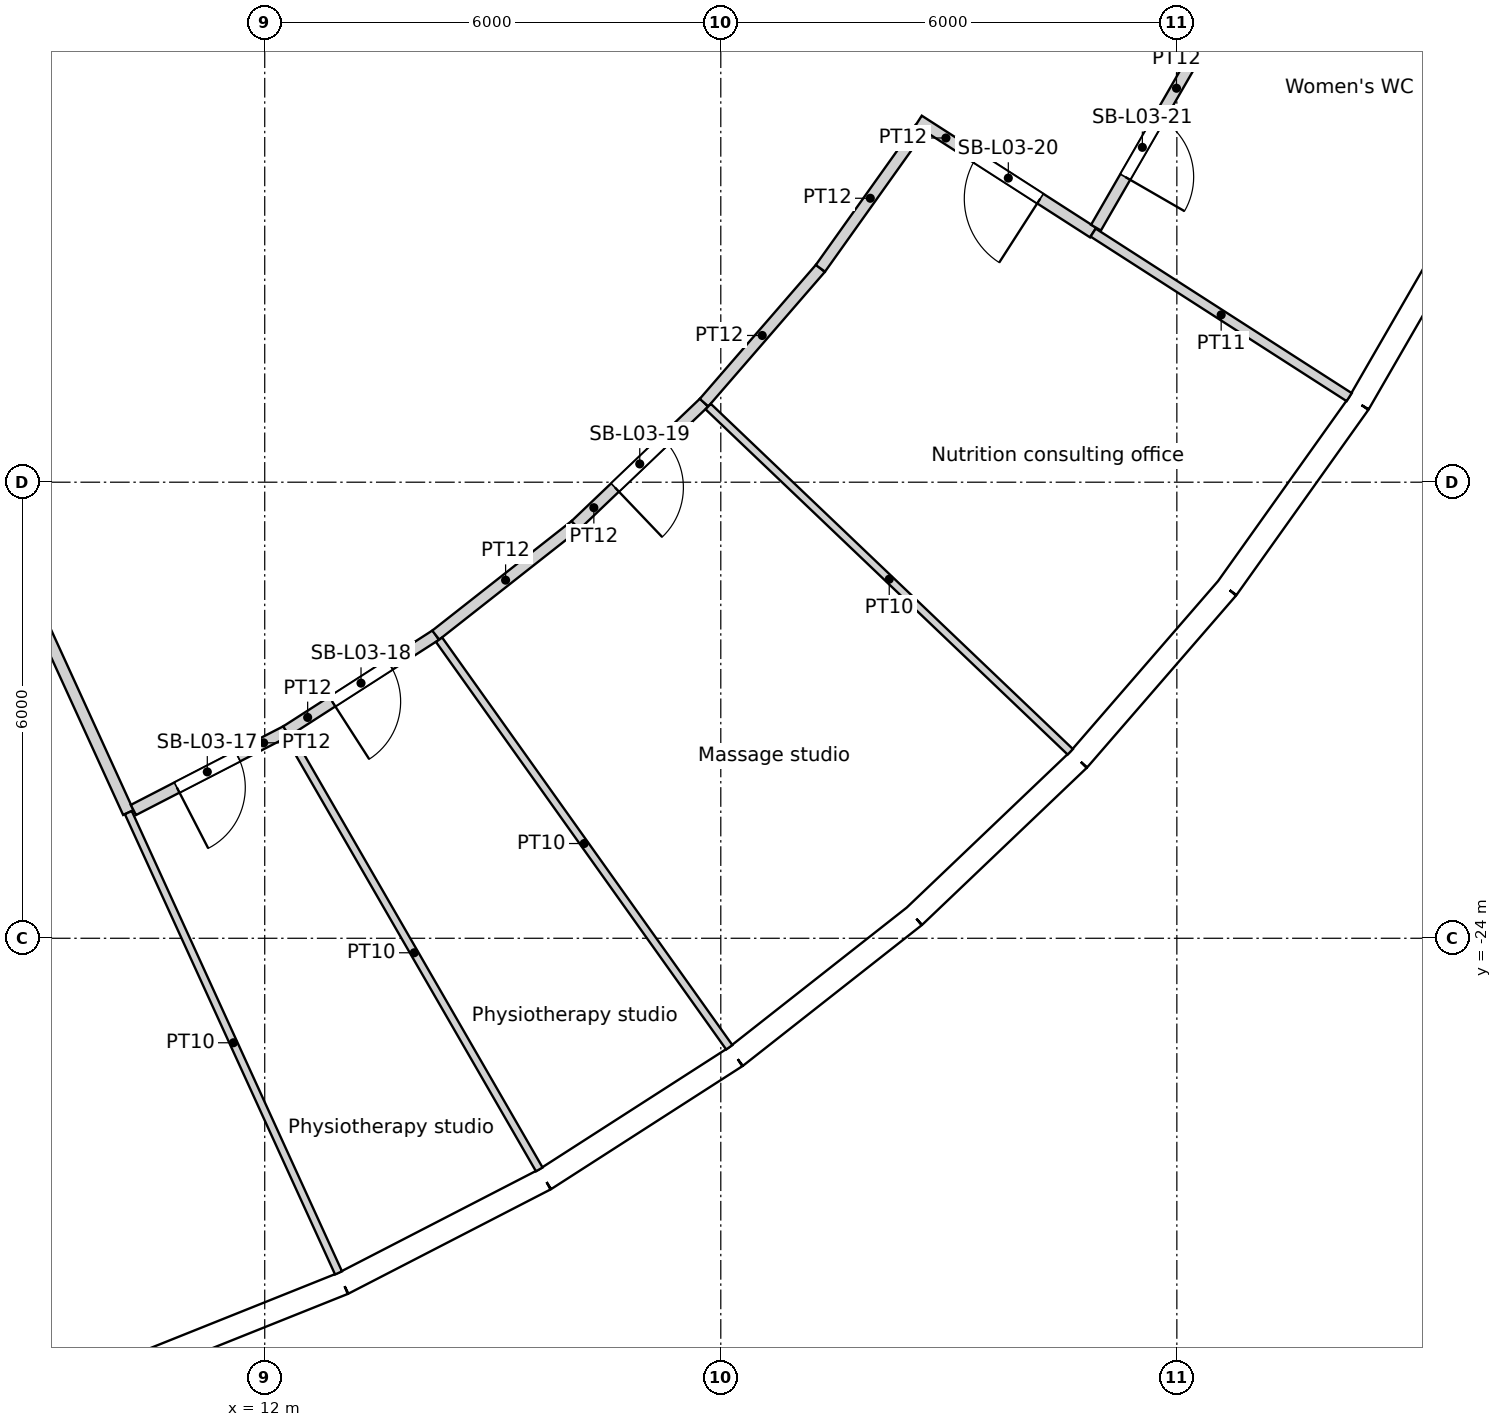
"""IFC4 building model, lengths in metres.
Left out: names, types, materials, properties, quantities, classifications, styles, units other than length and angle.
Written with IfcOpenShell. Run it as: python <this file> out.ifc"""

import sys

from ifc_helpers import new_model, si_unit, direction, frame, frame_2d, origin, origin_2d, place, context, subcontext, project, spatial, rectangle, circle, extrude, element, fill, save


model = new_model("IFC4")
c1 = context("Model", 3, precision=1e-05, world=origin(), true_north=direction((0.0, 1.0)))
c2 = subcontext(c1, "Body", "Model", "MODEL_VIEW")
j1 = project(units=[si_unit("LENGTHUNIT", "METRE"), si_unit("PLANEANGLEUNIT", "RADIAN")], contexts=[c1])
p1 = place(None, origin())
s1 = spatial("IfcSite", under=j1, at=p1, CompositionType="ELEMENT")
p2 = place(p1, origin())
s2 = spatial("IfcBuilding", under=s1, at=p2, CompositionType="ELEMENT")
p3 = place(p2, frame((0.0, 0.0, 18.6)))
s3 = spatial("IfcBuildingStorey", under=s2, at=p3, CompositionType="ELEMENT", Elevation=18.6)
for number, where, z_axis, x_axis in (
    (1, (12.576, -27.539, 0.0), (0.0, 0.0, 1.0), (1.0, 0.0, 0.0)),
    (2, (17.561, -24.661, 0.0), (0.0, 0.0, 1.0), (1.0, 0.0, 0.0)),
    (3, (21.911, -20.892, 0.0), (0.0, 0.0, 1.0), (1.0, 0.0, 0.0)),
    (4, (25.469, -16.368, 0.0), (0.0, 0.0, 1.0), (1.0, 0.0, 0.0)),
):
    element("IfcColumn", number, at=place(p3, frame(where, z_axis=z_axis, x_axis=x_axis)), inside=s3, PredefinedType="COLUMN", context=c2, shape_type="SweptSolid", body=[
        extrude(circle(Radius=0.7, at=origin_2d()), origin(), (0.0, 0.0, 1.0), 4.8),
    ])
for number, where, z_axis, x_axis in (
    (5, (9.723, -22.54, 0.0), (0.0, 0.0, 1.0), (1.0, 0.0, 0.0)),
    (6, (14.659, -19.69, 0.0), (0.0, 0.0, 1.0), (1.0, 0.0, 0.0)),
    (7, (18.805, -15.779, 0.0), (0.0, 0.0, 1.0), (1.0, 0.0, 0.0)),
):
    element("IfcColumn", number, at=place(p3, frame(where, z_axis=z_axis, x_axis=x_axis)), inside=s3, PredefinedType="COLUMN", context=c2, shape_type="SweptSolid", body=[
        extrude(circle(Radius=0.75, at=origin_2d()), origin(), (0.0, 0.0, 1.0), 4.8),
    ])
p4 = place(p3, frame((11.735, -14.716, 0.0), z_axis=(0.0, 0.0, 1.0), x_axis=(1.0, 0.0, 0.0)))
e8 = element("IfcColumn", 8, at=p4, inside=s3, PredefinedType="COLUMN", context=c2, shape_type="SweptSolid", body=[
    extrude(circle(Radius=0.8, at=origin_2d()), origin(), (0.0, 0.0, 1.0), 4.8),
])
p5 = place(p3, frame((10.261, -29.649, 0.0), z_axis=(0.0, 0.0, 1.0), x_axis=(0.928380795373, 0.371630325434, 0.0)))
e9 = element("IfcWall", 9, at=p5, inside=s3, PredefinedType="SOLIDWALL", context=c2, shape_type="SweptSolid", body=[
    extrude(rectangle(XDim=2.986, YDim=0.3, at=frame_2d((1.493, 0.0))), origin(), (0.0, 0.0, 1.0), 4.35),
])
p6 = place(p5, frame((1.493, 0.0, 2.0)))
e10 = element("IfcOpeningElement", 10, at=p6, cuts=e9, PredefinedType="OPENING", context=c2, shape_type="SweptSolid", body=[
    extrude(circle(Radius=1.2, at=origin_2d()), frame((0.0, 0.16, 0.0), z_axis=(0.0, -1.0, 0.0), x_axis=(1.0, 0.0, 0.0)), (0.0, 0.0, 1.0), 0.32),
])
p7 = place(p3, frame((13.033, -28.539, 0.0), z_axis=(0.0, 0.0, 1.0), x_axis=(0.888831268481, 0.458234630043, 0.0)))
e11 = element("IfcWall", 11, at=p7, inside=s3, PredefinedType="SOLIDWALL", context=c2, shape_type="SweptSolid", body=[
    extrude(rectangle(XDim=2.986, YDim=0.3, at=frame_2d((1.493, 0.0))), origin(), (0.0, 0.0, 1.0), 4.35),
])
p8 = place(p7, frame((1.493, 0.0, 2.0)))
e12 = element("IfcOpeningElement", 12, at=p8, cuts=e11, PredefinedType="OPENING", context=c2, shape_type="SweptSolid", body=[
    extrude(circle(Radius=1.2, at=origin_2d()), frame((0.0, 0.16, 0.0), z_axis=(0.0, -1.0, 0.0), x_axis=(1.0, 0.0, 0.0)), (0.0, 0.0, 1.0), 0.32),
])
p9 = place(p3, frame((15.687, -27.171, 0.0), z_axis=(0.0, 0.0, 1.0), x_axis=(0.841242231846, 0.540658401727, 0.0)))
e13 = element("IfcWall", 13, at=p9, inside=s3, PredefinedType="SOLIDWALL", context=c2, shape_type="SweptSolid", body=[
    extrude(rectangle(XDim=2.986, YDim=0.3, at=frame_2d((1.493, 0.0))), origin(), (0.0, 0.0, 1.0), 4.35),
])
p10 = place(p9, frame((1.493, 0.0, 2.0)))
e14 = element("IfcOpeningElement", 14, at=p10, cuts=e13, PredefinedType="OPENING", context=c2, shape_type="SweptSolid", body=[
    extrude(circle(Radius=1.2, at=origin_2d()), frame((0.0, 0.16, 0.0), z_axis=(0.0, -1.0, 0.0), x_axis=(1.0, 0.0, 0.0)), (0.0, 0.0, 1.0), 0.32),
])
p11 = place(p3, frame((18.199, -25.557, 0.0), z_axis=(0.0, 0.0, 1.0), x_axis=(0.786043032847, 0.618171780747, 0.0)))
e15 = element("IfcWall", 15, at=p11, inside=s3, PredefinedType="SOLIDWALL", context=c2, shape_type="SweptSolid", body=[
    extrude(rectangle(XDim=2.986, YDim=0.3, at=frame_2d((1.493, 0.0))), origin(), (0.0, 0.0, 1.0), 4.35),
])
p12 = place(p11, frame((1.493, 0.0, 2.0)))
e16 = element("IfcOpeningElement", 16, at=p12, cuts=e15, PredefinedType="OPENING", context=c2, shape_type="SweptSolid", body=[
    extrude(circle(Radius=1.2, at=origin_2d()), frame((0.0, 0.16, 0.0), z_axis=(0.0, -1.0, 0.0), x_axis=(1.0, 0.0, 0.0)), (0.0, 0.0, 1.0), 0.32),
])
p13 = place(p3, frame((20.546, -23.711, 0.0), z_axis=(0.0, 0.0, 1.0), x_axis=(0.723750841228, 0.690061388444, 0.0)))
e17 = element("IfcWall", 17, at=p13, inside=s3, PredefinedType="SOLIDWALL", context=c2, shape_type="SweptSolid", body=[
    extrude(rectangle(XDim=2.986, YDim=0.3, at=frame_2d((1.493, 0.0))), origin(), (0.0, 0.0, 1.0), 4.35),
])
p14 = place(p13, frame((1.493, 0.0, 2.0)))
e18 = element("IfcOpeningElement", 18, at=p14, cuts=e17, PredefinedType="OPENING", context=c2, shape_type="SweptSolid", body=[
    extrude(circle(Radius=1.2, at=origin_2d()), frame((0.0, 0.16, 0.0), z_axis=(0.0, -1.0, 0.0), x_axis=(1.0, 0.0, 0.0)), (0.0, 0.0, 1.0), 0.32),
])
p15 = place(p3, frame((22.707, -21.651, 0.0), z_axis=(0.0, 0.0, 1.0), x_axis=(0.654809121128, 0.755794294029, 0.0)))
e19 = element("IfcWall", 19, at=p15, inside=s3, PredefinedType="SOLIDWALL", context=c2, shape_type="SweptSolid", body=[
    extrude(rectangle(XDim=2.986, YDim=0.3, at=frame_2d((1.493, 0.0))), origin(), (0.0, 0.0, 1.0), 4.35),
])
p16 = place(p15, frame((1.493, 0.0, 2.0)))
e20 = element("IfcOpeningElement", 20, at=p16, cuts=e19, PredefinedType="OPENING", context=c2, shape_type="SweptSolid", body=[
    extrude(circle(Radius=1.2, at=origin_2d()), frame((0.0, 0.16, 0.0), z_axis=(0.0, -1.0, 0.0), x_axis=(1.0, 0.0, 0.0)), (0.0, 0.0, 1.0), 0.32),
])
p17 = place(p3, frame((24.662, -19.394, 0.0), z_axis=(0.0, 0.0, 1.0), x_axis=(0.580100533892, 0.814544885551, 0.0)))
e21 = element("IfcWall", 21, at=p17, inside=s3, PredefinedType="SOLIDWALL", context=c2, shape_type="SweptSolid", body=[
    extrude(rectangle(XDim=2.986, YDim=0.3, at=frame_2d((1.493, 0.0))), origin(), (0.0, 0.0, 1.0), 4.35),
])
p18 = place(p17, frame((1.493, 0.0, 2.0)))
e22 = element("IfcOpeningElement", 22, at=p18, cuts=e21, PredefinedType="OPENING", context=c2, shape_type="SweptSolid", body=[
    extrude(circle(Radius=1.2, at=origin_2d()), frame((0.0, 0.16, 0.0), z_axis=(0.0, -1.0, 0.0), x_axis=(1.0, 0.0, 0.0)), (0.0, 0.0, 1.0), 0.32),
])
p19 = place(p3, frame((26.394, -16.962, 0.0), z_axis=(0.0, 0.0, 1.0), x_axis=(0.500017373705, 0.866015372839, 0.0)))
e23 = element("IfcWall", 23, at=p19, inside=s3, PredefinedType="SOLIDWALL", context=c2, shape_type="SweptSolid", body=[
    extrude(rectangle(XDim=2.986, YDim=0.3, at=frame_2d((1.493, 0.0))), origin(), (0.0, 0.0, 1.0), 4.35),
])
p20 = place(p19, frame((1.493, 0.0, 2.0)))
e24 = element("IfcOpeningElement", 24, at=p20, cuts=e23, PredefinedType="OPENING", context=c2, shape_type="SweptSolid", body=[
    extrude(circle(Radius=1.2, at=origin_2d()), frame((0.0, 0.16, 0.0), z_axis=(0.0, -1.0, 0.0), x_axis=(1.0, 0.0, 0.0)), (0.0, 0.0, 1.0), 0.32),
])
p21 = place(p3, frame((10.205, -22.347, 0.0), z_axis=(0.0, 0.0, 1.0), x_axis=(-0.415410432201, 0.909634087322, 0.0)))
e25 = element("IfcWall", 25, at=p21, inside=s3, PredefinedType="PARTITIONING", context=c2, shape_type="SweptSolid", body=[
    extrude(rectangle(XDim=10.935, YDim=0.15, at=frame_2d((5.467, 0.0))), origin(), (0.0, 0.0, 1.0), 3.75),
])
p22 = place(p3, frame((12.283, -21.275, 0.0), z_axis=(0.0, 0.0, 1.0), x_axis=(-0.888834753306, -0.458227870514, 0.0)))
e26 = element("IfcWall", 26, at=p22, inside=s3, PredefinedType="PARTITIONING", context=c2, shape_type="SweptSolid", body=[
    extrude(rectangle(XDim=2.263, YDim=0.15, at=frame_2d((1.131, 0.0))), origin(), (0.0, 0.0, 1.0), 3.75),
])
p23 = place(p22, frame((0.719, 0.0, 0.0)))
e27 = element("IfcOpeningElement", 27, at=p23, cuts=e26, PredefinedType="OPENING", context=c2, shape_type="SweptSolid", body=[
    extrude(rectangle(XDim=0.9, YDim=2.1, at=frame_2d((0.45, 1.05))), frame((0.0, 0.075, 0.0), z_axis=(0.0, -1.0, 0.0), x_axis=(1.0, 0.0, 0.0)), (0.0, 0.0, 1.0), 0.15),
])
p24 = place(p3, frame((14.25, -20.011, 0.0), z_axis=(0.0, 0.0, 1.0), x_axis=(-0.841236155743, -0.540667855777, 0.0)))
e28 = element("IfcWall", 28, at=p24, inside=s3, PredefinedType="PARTITIONING", context=c2, shape_type="SweptSolid", body=[
    extrude(rectangle(XDim=2.338, YDim=0.15, at=frame_2d((1.169, 0.0))), origin(), (0.0, 0.0, 1.0), 3.75),
])
p25 = place(p24, frame((0.719, 0.0, 0.0)))
e29 = element("IfcOpeningElement", 29, at=p25, cuts=e28, PredefinedType="OPENING", context=c2, shape_type="SweptSolid", body=[
    extrude(rectangle(XDim=0.9, YDim=2.1, at=frame_2d((0.45, 1.05))), frame((0.0, 0.075, 0.0), z_axis=(0.0, -1.0, 0.0), x_axis=(1.0, 0.0, 0.0)), (0.0, 0.0, 1.0), 0.15),
])
p26 = place(p3, frame((12.971, -28.403, 0.0), z_axis=(0.0, 0.0, 1.0), x_axis=(-0.415413073128, 0.909632881263, 0.0)))
e30 = element("IfcWall", 30, at=p26, inside=s3, PredefinedType="PARTITIONING", context=c2, shape_type="SweptSolid", body=[
    extrude(rectangle(XDim=6.657, YDim=0.1, at=frame_2d((3.329, 0.0))), origin(), (0.0, 0.0, 1.0), 3.75),
])
p27 = place(p3, frame((14.25, -20.011, 0.0), z_axis=(0.0, 0.0, 1.0), x_axis=(0.786108126536, 0.618089001191, 0.0)))
e31 = element("IfcWall", 31, at=p27, inside=s3, PredefinedType="PARTITIONING", context=c2, shape_type="SweptSolid", body=[
    extrude(rectangle(XDim=2.338, YDim=0.15, at=frame_2d((1.169, 0.0))), origin(), (0.0, 0.0, 1.0), 3.75),
])
p28 = place(p3, frame((15.612, -27.041, 0.0), z_axis=(0.0, 0.0, 1.0), x_axis=(-0.499996417602, 0.866027472073, 0.0)))
e32 = element("IfcWall", 32, at=p28, inside=s3, PredefinedType="PARTITIONING", context=c2, shape_type="SweptSolid", body=[
    extrude(rectangle(XDim=6.583, YDim=0.1, at=frame_2d((3.291, 0.0))), origin(), (0.0, 0.0, 1.0), 3.75),
])
p29 = place(p3, frame((17.78, -16.953, 0.0), z_axis=(0.0, 0.0, 1.0), x_axis=(-0.723668407542, -0.690147836283, 0.0)))
e33 = element("IfcWall", 33, at=p29, inside=s3, PredefinedType="PARTITIONING", context=c2, shape_type="SweptSolid", body=[
    extrude(rectangle(XDim=2.338, YDim=0.15, at=frame_2d((1.169, 0.0))), origin(), (0.0, 0.0, 1.0), 3.75),
])
p30 = place(p29, frame((0.719, 0.0, 0.0)))
e34 = element("IfcOpeningElement", 34, at=p30, cuts=e33, PredefinedType="OPENING", context=c2, shape_type="SweptSolid", body=[
    extrude(rectangle(XDim=0.9, YDim=2.1, at=frame_2d((0.45, 1.05))), frame((0.0, 0.075, 0.0), z_axis=(0.0, -1.0, 0.0), x_axis=(1.0, 0.0, 0.0)), (0.0, 0.0, 1.0), 0.15),
])
p31 = place(p3, frame((17.78, -16.953, 0.0), z_axis=(0.0, 0.0, 1.0), x_axis=(0.654866925236, 0.755744209526, 0.0)))
e35 = element("IfcWall", 35, at=p31, inside=s3, PredefinedType="PARTITIONING", context=c2, shape_type="SweptSolid", body=[
    extrude(rectangle(XDim=2.338, YDim=0.15, at=frame_2d((1.169, 0.0))), origin(), (0.0, 0.0, 1.0), 3.75),
])
p32 = place(p3, frame((18.112, -25.435, 0.0), z_axis=(0.0, 0.0, 1.0), x_axis=(-0.580055201519, 0.814577168346, 0.0)))
e36 = element("IfcWall", 36, at=p32, inside=s3, PredefinedType="PARTITIONING", context=c2, shape_type="SweptSolid", body=[
    extrude(rectangle(XDim=6.582, YDim=0.1, at=frame_2d((3.291, 0.0))), origin(), (0.0, 0.0, 1.0), 3.75),
])
p33 = place(p3, frame((19.311, -15.186, 0.0), z_axis=(0.0, 0.0, 1.0), x_axis=(0.580084218863, 0.814556504501, 0.0)))
e37 = element("IfcWall", 37, at=p33, inside=s3, PredefinedType="PARTITIONING", context=c2, shape_type="SweptSolid", body=[
    extrude(rectangle(XDim=2.263, YDim=0.15, at=frame_2d((1.131, 0.0))), origin(), (0.0, 0.0, 1.0), 3.75),
])
p34 = place(p3, frame((22.598, -21.547, 0.0), z_axis=(0.0, 0.0, 1.0), x_axis=(-0.723762960711, 0.690048677054, 0.0)))
e38 = element("IfcWall", 38, at=p34, inside=s3, PredefinedType="PARTITIONING", context=c2, shape_type="SweptSolid", body=[
    extrude(rectangle(XDim=6.583, YDim=0.1, at=frame_2d((3.291, 0.0))), origin(), (0.0, 0.0, 1.0), 3.75),
])
p35 = place(p3, frame((22.899, -14.716, 0.0), z_axis=(0.0, 0.0, 1.0), x_axis=(-0.841254069526, 0.540639982341, 0.0)))
e39 = element("IfcWall", 39, at=p35, inside=s3, PredefinedType="PARTITIONING", context=c2, shape_type="SweptSolid", body=[
    extrude(rectangle(XDim=2.728, YDim=0.15, at=frame_2d((1.364, 0.0))), origin(), (0.0, 0.0, 1.0), 3.75),
])
p36 = place(p35, frame((0.826, 0.0, 0.0)))
e40 = element("IfcOpeningElement", 40, at=p36, cuts=e39, PredefinedType="OPENING", context=c2, shape_type="SweptSolid", body=[
    extrude(rectangle(XDim=1.0, YDim=2.1, at=frame_2d((0.5, 1.05))), frame((0.0, 0.075, 0.0), z_axis=(0.0, -1.0, 0.0), x_axis=(1.0, 0.0, 0.0)), (0.0, 0.0, 1.0), 0.15),
])
p37 = place(p3, frame((24.194, -12.473, 0.0), z_axis=(0.0, 0.0, 1.0), x_axis=(-0.499991329354, -0.866030409726, 0.0)))
e41 = element("IfcWall", 41, at=p37, inside=s3, PredefinedType="PARTITIONING", context=c2, shape_type="SweptSolid", body=[
    extrude(rectangle(XDim=2.515, YDim=0.15, at=frame_2d((1.258, 0.0))), origin(), (0.0, 0.0, 1.0), 3.75),
])
p38 = place(p37, frame((0.845, 0.0, 0.0)))
e42 = element("IfcOpeningElement", 42, at=p38, cuts=e41, PredefinedType="OPENING", context=c2, shape_type="SweptSolid", body=[
    extrude(rectangle(XDim=0.9, YDim=2.1, at=frame_2d((0.45, 1.05))), frame((0.0, 0.075, 0.0), z_axis=(0.0, -1.0, 0.0), x_axis=(1.0, 0.0, 0.0)), (0.0, 0.0, 1.0), 0.15),
])
p39 = place(p3, frame((24.194, -12.473, 0.0), z_axis=(0.0, 0.0, 1.0), x_axis=(0.415411078746, 0.909633792059, 0.0)))
e43 = element("IfcWall", 43, at=p39, inside=s3, PredefinedType="PARTITIONING", context=c2, shape_type="SweptSolid", body=[
    extrude(rectangle(XDim=2.515, YDim=0.15, at=frame_2d((1.258, 0.0))), origin(), (0.0, 0.0, 1.0), 3.75),
])
p40 = place(p3, frame((26.268, -16.881, 0.0), z_axis=(0.0, 0.0, 1.0), x_axis=(-0.841255718443, 0.540637416563, 0.0)))
e44 = element("IfcWall", 44, at=p40, inside=s3, PredefinedType="PARTITIONING", context=c2, shape_type="SweptSolid", body=[
    extrude(rectangle(XDim=4.005, YDim=0.125, at=frame_2d((2.002, 0.0))), origin(), (0.0, 0.0, 1.0), 3.75),
])
p41 = place(p6, origin())
e45 = element("IfcWindow", 45, at=p41, inside=s3, PartitioningType="SINGLE_PANEL", PredefinedType="WINDOW", context=c2, shape_type="SweptSolid", body=[
    extrude(circle(Radius=1.2, at=origin_2d()), frame((0.0, 0.12, 0.0), z_axis=(0.0, -1.0, 0.0), x_axis=(1.0, 0.0, 0.0)), (0.0, 0.0, 1.0), 0.1),
])
fill(e10, e45)
p42 = place(p8, origin())
e46 = element("IfcWindow", 46, at=p42, inside=s3, PartitioningType="SINGLE_PANEL", PredefinedType="WINDOW", context=c2, shape_type="SweptSolid", body=[
    extrude(circle(Radius=1.2, at=origin_2d()), frame((0.0, 0.12, 0.0), z_axis=(0.0, -1.0, 0.0), x_axis=(1.0, 0.0, 0.0)), (0.0, 0.0, 1.0), 0.1),
])
fill(e12, e46)
p43 = place(p10, origin())
e47 = element("IfcWindow", 47, at=p43, inside=s3, PartitioningType="SINGLE_PANEL", PredefinedType="WINDOW", context=c2, shape_type="SweptSolid", body=[
    extrude(circle(Radius=1.2, at=origin_2d()), frame((0.0, 0.12, 0.0), z_axis=(0.0, -1.0, 0.0), x_axis=(1.0, 0.0, 0.0)), (0.0, 0.0, 1.0), 0.1),
])
fill(e14, e47)
p44 = place(p12, origin())
e48 = element("IfcWindow", 48, at=p44, inside=s3, PartitioningType="SINGLE_PANEL", PredefinedType="WINDOW", context=c2, shape_type="SweptSolid", body=[
    extrude(circle(Radius=1.2, at=origin_2d()), frame((0.0, 0.12, 0.0), z_axis=(0.0, -1.0, 0.0), x_axis=(1.0, 0.0, 0.0)), (0.0, 0.0, 1.0), 0.1),
])
fill(e16, e48)
p45 = place(p14, origin())
e49 = element("IfcWindow", 49, at=p45, inside=s3, PartitioningType="SINGLE_PANEL", PredefinedType="WINDOW", context=c2, shape_type="SweptSolid", body=[
    extrude(circle(Radius=1.2, at=origin_2d()), frame((0.0, 0.12, 0.0), z_axis=(0.0, -1.0, 0.0), x_axis=(1.0, 0.0, 0.0)), (0.0, 0.0, 1.0), 0.1),
])
fill(e18, e49)
p46 = place(p16, origin())
e50 = element("IfcWindow", 50, at=p46, inside=s3, PartitioningType="SINGLE_PANEL", PredefinedType="WINDOW", context=c2, shape_type="SweptSolid", body=[
    extrude(circle(Radius=1.2, at=origin_2d()), frame((0.0, 0.12, 0.0), z_axis=(0.0, -1.0, 0.0), x_axis=(1.0, 0.0, 0.0)), (0.0, 0.0, 1.0), 0.1),
])
fill(e20, e50)
p47 = place(p18, origin())
e51 = element("IfcWindow", 51, at=p47, inside=s3, PartitioningType="SINGLE_PANEL", PredefinedType="WINDOW", context=c2, shape_type="SweptSolid", body=[
    extrude(circle(Radius=1.2, at=origin_2d()), frame((0.0, 0.12, 0.0), z_axis=(0.0, -1.0, 0.0), x_axis=(1.0, 0.0, 0.0)), (0.0, 0.0, 1.0), 0.1),
])
fill(e22, e51)
p48 = place(p20, origin())
e52 = element("IfcWindow", 52, at=p48, inside=s3, PartitioningType="SINGLE_PANEL", PredefinedType="WINDOW", context=c2, shape_type="SweptSolid", body=[
    extrude(circle(Radius=1.2, at=origin_2d()), frame((0.0, 0.12, 0.0), z_axis=(0.0, -1.0, 0.0), x_axis=(1.0, 0.0, 0.0)), (0.0, 0.0, 1.0), 0.1),
])
fill(e24, e52)
p49 = place(p23, origin())
e53 = element("IfcDoor", 53, at=p49, inside=s3, OperationType="SINGLE_SWING_RIGHT", PredefinedType="DOOR", context=c2, shape_type="SweptSolid", body=[
    extrude(rectangle(XDim=0.9, YDim=2.1, at=frame_2d((0.45, 1.05))), frame((0.0, 0.025, 0.0), z_axis=(0.0, -1.0, 0.0), x_axis=(1.0, 0.0, 0.0)), (0.0, 0.0, 1.0), 0.05),
])
fill(e27, e53)
p50 = place(p25, origin())
e54 = element("IfcDoor", 54, at=p50, inside=s3, OperationType="SINGLE_SWING_RIGHT", PredefinedType="DOOR", context=c2, shape_type="SweptSolid", body=[
    extrude(rectangle(XDim=0.9, YDim=2.1, at=frame_2d((0.45, 1.05))), frame((0.0, 0.025, 0.0), z_axis=(0.0, -1.0, 0.0), x_axis=(1.0, 0.0, 0.0)), (0.0, 0.0, 1.0), 0.05),
])
fill(e29, e54)
p51 = place(p30, origin())
e55 = element("IfcDoor", 55, at=p51, inside=s3, OperationType="SINGLE_SWING_RIGHT", PredefinedType="DOOR", context=c2, shape_type="SweptSolid", body=[
    extrude(rectangle(XDim=0.9, YDim=2.1, at=frame_2d((0.45, 1.05))), frame((0.0, 0.025, 0.0), z_axis=(0.0, -1.0, 0.0), x_axis=(1.0, 0.0, 0.0)), (0.0, 0.0, 1.0), 0.05),
])
fill(e34, e55)
p52 = place(p36, origin())
e56 = element("IfcDoor", 56, at=p52, inside=s3, OperationType="SINGLE_SWING_LEFT", PredefinedType="DOOR", context=c2, shape_type="SweptSolid", body=[
    extrude(rectangle(XDim=1.0, YDim=2.1, at=frame_2d((0.5, 1.05))), frame((0.0, 0.025, 0.0), z_axis=(0.0, -1.0, 0.0), x_axis=(1.0, 0.0, 0.0)), (0.0, 0.0, 1.0), 0.05),
])
fill(e40, e56)
p53 = place(p38, origin())
e57 = element("IfcDoor", 57, at=p53, inside=s3, OperationType="SINGLE_SWING_RIGHT", PredefinedType="DOOR", context=c2, shape_type="SweptSolid", body=[
    extrude(rectangle(XDim=0.9, YDim=2.1, at=frame_2d((0.45, 1.05))), frame((0.0, 0.025, 0.0), z_axis=(0.0, -1.0, 0.0), x_axis=(1.0, 0.0, 0.0)), (0.0, 0.0, 1.0), 0.05),
])
fill(e42, e57)
save(model, sys.argv[1])
